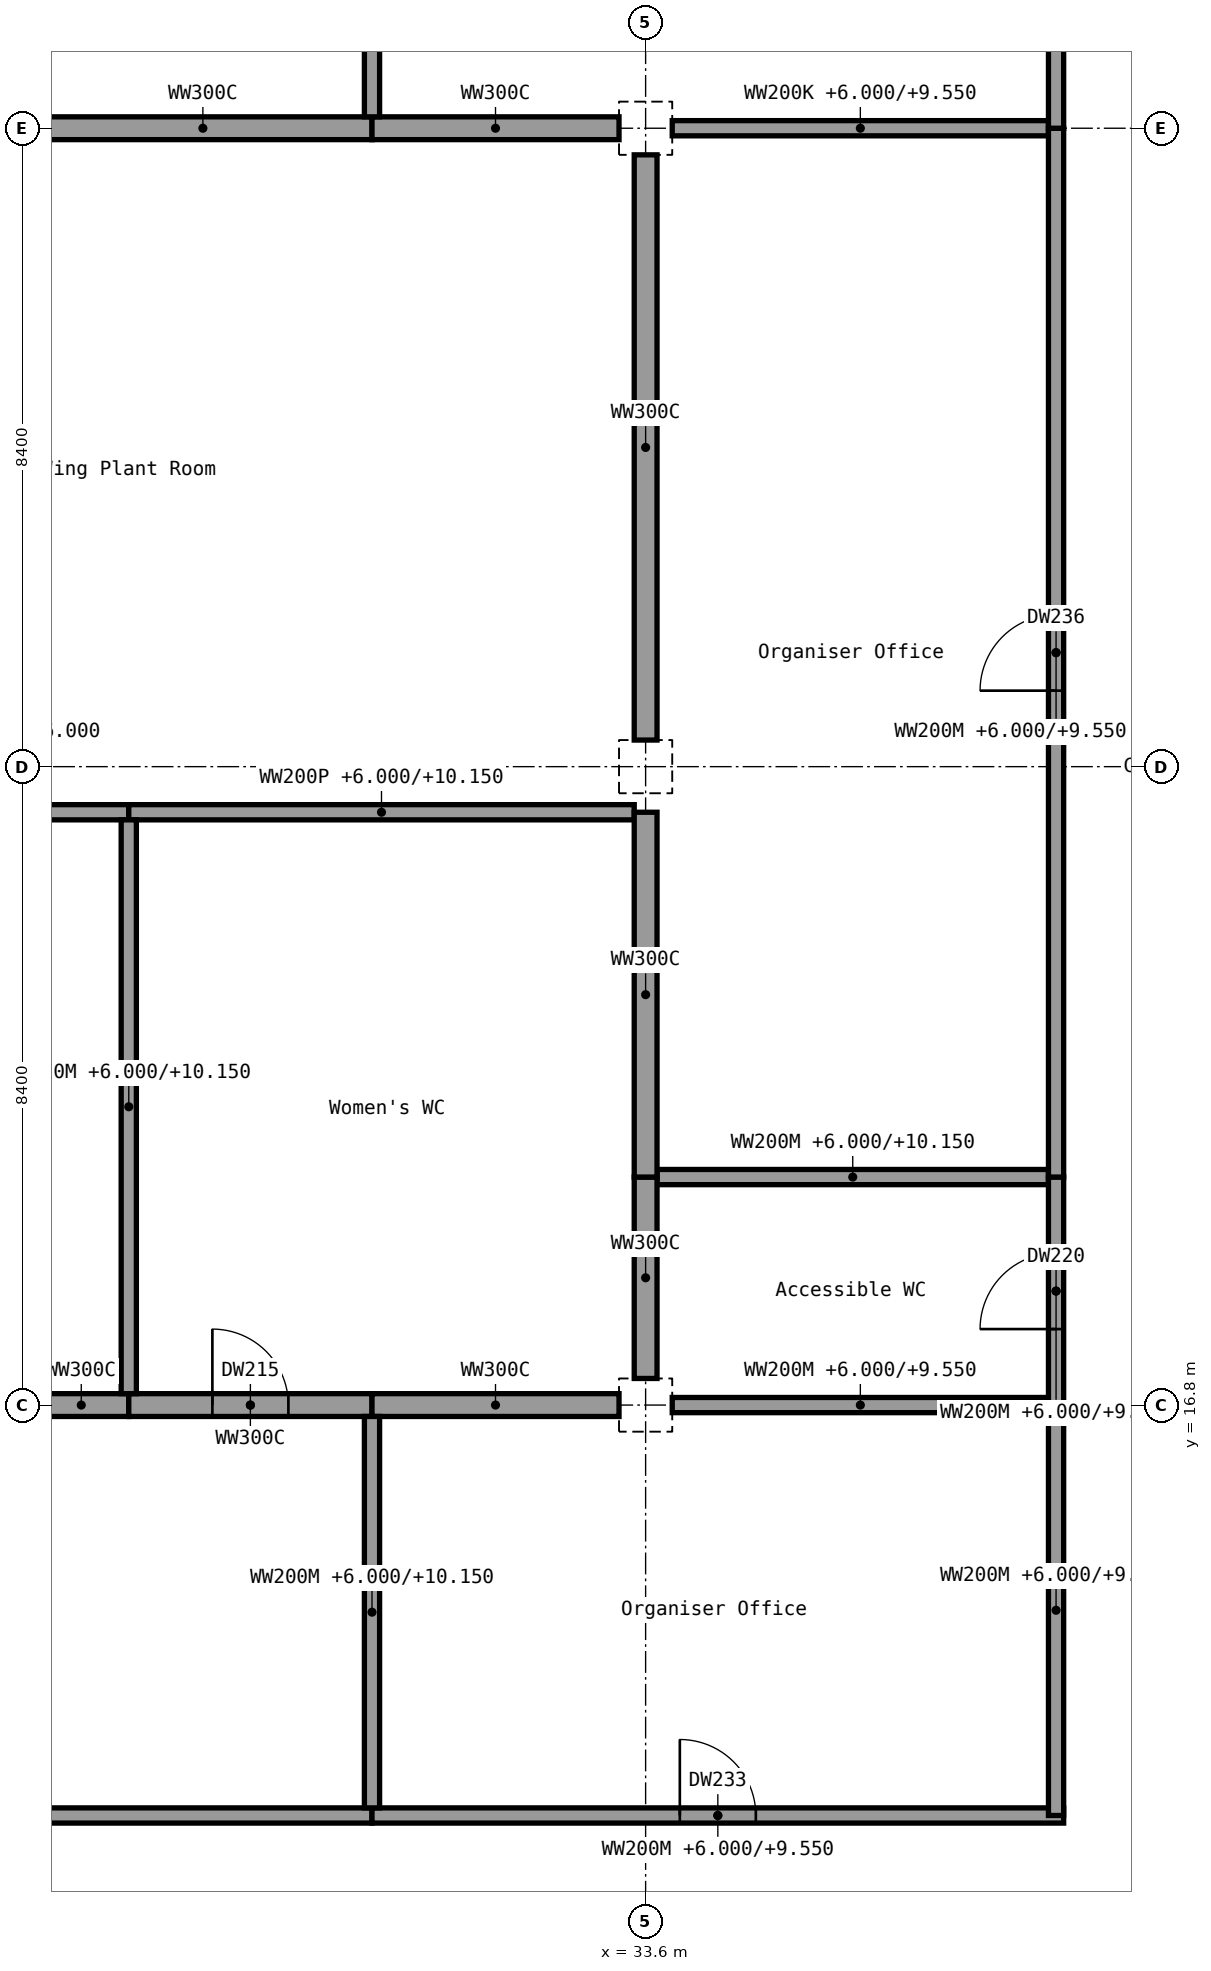
"""IFC4 building model, lengths in metres.
Left out: names, types, materials, properties, quantities, classifications, styles, units other than length and angle.
Written with IfcOpenShell. Run it as: python <this file> out.ifc"""

import sys

from ifc_helpers import new_model, si_unit, direction, frame, frame_2d, origin, origin_2d, place, context, subcontext, project, spatial, rectangle, extrude, element, fill, save


model = new_model("IFC4")
c1 = context("Model", 3, precision=1e-05, world=origin(), true_north=direction((0.0, 1.0)))
c2 = subcontext(c1, "Body", "Model", "MODEL_VIEW")
j1 = project(units=[si_unit("LENGTHUNIT", "METRE"), si_unit("PLANEANGLEUNIT", "RADIAN")], contexts=[c1])
p1 = place(None, origin())
s1 = spatial("IfcSite", under=j1, at=p1, CompositionType="ELEMENT")
p2 = place(p1, origin())
s2 = spatial("IfcBuilding", under=s1, at=p2, CompositionType="ELEMENT")
p3 = place(p2, frame((0.0, 0.0, 6.0)))
s3 = spatial("IfcBuildingStorey", under=s2, at=p3, CompositionType="ELEMENT", Elevation=6.0)
for number, where, z_axis, x_axis in (
    (1, (33.6, 16.8, 0.0), (0.0, 0.0, 1.0), (1.0, 0.0, 0.0)),
    (2, (33.6, 25.2, 0.0), (0.0, 0.0, 1.0), (1.0, 0.0, 0.0)),
    (3, (33.6, 33.6, 0.0), (0.0, 0.0, 1.0), (1.0, 0.0, 0.0)),
):
    element("IfcColumn", number, at=place(p3, frame(where, z_axis=z_axis, x_axis=x_axis)), inside=s3, PredefinedType="COLUMN", context=c2, shape_type="SweptSolid", body=[
        extrude(rectangle(XDim=0.7, YDim=0.7, at=origin_2d()), origin(), (0.0, 0.0, 1.0), 4.5),
    ])
p4 = place(p3, frame((18.0, 11.4, 0.0), z_axis=(0.0, 0.0, 1.0), x_axis=(1.0, 0.0, 0.0)))
e4 = element("IfcWall", 4, at=p4, inside=s3, PredefinedType="PARTITIONING", context=c2, shape_type="SweptSolid", body=[
    extrude(rectangle(XDim=12.0, YDim=0.2, at=frame_2d((6.0, 0.0))), origin(), (0.0, 0.0, 1.0), 3.55),
])
p5 = place(p4, frame((5.5, 0.0, 0.0)))
e5 = element("IfcOpeningElement", 5, at=p5, cuts=e4, PredefinedType="OPENING", context=c2, shape_type="SweptSolid", body=[
    extrude(rectangle(XDim=1.0, YDim=2.1, at=frame_2d((0.5, 1.05))), frame((0.0, 0.1, 0.0), z_axis=(0.0, -1.0, 0.0), x_axis=(1.0, 0.0, 0.0)), (0.0, 0.0, 1.0), 0.2),
])
p6 = place(p3, frame((30.0, 11.4, 0.0), z_axis=(0.0, 0.0, 1.0), x_axis=(1.0, 0.0, 0.0)))
e6 = element("IfcWall", 6, at=p6, inside=s3, PredefinedType="PARTITIONING", context=c2, shape_type="SweptSolid", body=[
    extrude(rectangle(XDim=9.1, YDim=0.2, at=frame_2d((4.55, 0.0))), origin(), (0.0, 0.0, 1.0), 3.55),
])
p7 = place(p6, frame((4.05, 0.0, 0.0)))
e7 = element("IfcOpeningElement", 7, at=p7, cuts=e6, PredefinedType="OPENING", context=c2, shape_type="SweptSolid", body=[
    extrude(rectangle(XDim=1.0, YDim=2.1, at=frame_2d((0.5, 1.05))), frame((0.0, 0.1, 0.0), z_axis=(0.0, -1.0, 0.0), x_axis=(1.0, 0.0, 0.0)), (0.0, 0.0, 1.0), 0.2),
])
p8 = place(p3, frame((25.55, 16.8, 0.0), z_axis=(0.0, 0.0, 1.0), x_axis=(1.0, 0.0, 0.0)))
e8 = element("IfcWall", 8, at=p8, inside=s3, PredefinedType="SHEAR", context=c2, shape_type="SweptSolid", body=[
    extrude(rectangle(XDim=1.25, YDim=0.3, at=frame_2d((0.625, 0.0))), origin(), (0.0, 0.0, 1.0), 4.15),
])
p9 = place(p3, frame((26.8, 16.8, 0.0), z_axis=(0.0, 0.0, 1.0), x_axis=(1.0, 0.0, 0.0)))
e9 = element("IfcWall", 9, at=p9, inside=s3, PredefinedType="SHEAR", context=c2, shape_type="SweptSolid", body=[
    extrude(rectangle(XDim=3.2, YDim=0.3, at=frame_2d((1.6, 0.0))), origin(), (0.0, 0.0, 1.0), 4.15),
])
p10 = place(p9, frame((1.1, 0.0, 0.0)))
e10 = element("IfcOpeningElement", 10, at=p10, cuts=e9, PredefinedType="OPENING", context=c2, shape_type="SweptSolid", body=[
    extrude(rectangle(XDim=1.0, YDim=2.1, at=frame_2d((0.5, 1.05))), frame((0.0, 0.15, 0.0), z_axis=(0.0, -1.0, 0.0), x_axis=(1.0, 0.0, 0.0)), (0.0, 0.0, 1.0), 0.3),
])
p11 = place(p3, frame((30.0, 16.8, 0.0), z_axis=(0.0, 0.0, 1.0), x_axis=(1.0, 0.0, 0.0)))
e11 = element("IfcWall", 11, at=p11, inside=s3, PredefinedType="SHEAR", context=c2, shape_type="SweptSolid", body=[
    extrude(rectangle(XDim=3.25, YDim=0.3, at=frame_2d((1.625, 0.0))), origin(), (0.0, 0.0, 1.0), 4.15),
])
p12 = place(p3, frame((33.95, 16.8, 0.0), z_axis=(0.0, 0.0, 1.0), x_axis=(1.0, 0.0, 0.0)))
e12 = element("IfcWall", 12, at=p12, inside=s3, PredefinedType="PARTITIONING", context=c2, shape_type="SweptSolid", body=[
    extrude(rectangle(XDim=4.95, YDim=0.2, at=frame_2d((2.475, 0.0))), origin(), (0.0, 0.0, 1.0), 3.55),
])
p13 = place(p3, frame((33.75, 19.8, 0.0), z_axis=(0.0, 0.0, 1.0), x_axis=(1.0, 0.0, 0.0)))
e13 = element("IfcWall", 13, at=p13, inside=s3, PredefinedType="PARTITIONING", context=c2, shape_type="SweptSolid", body=[
    extrude(rectangle(XDim=5.15, YDim=0.2, at=frame_2d((2.575, 0.0))), origin(), (0.0, 0.0, 1.0), 4.15),
])
p14 = place(p3, frame((20.1, 24.6, 0.0), z_axis=(0.0, 0.0, 1.0), x_axis=(1.0, 0.0, 0.0)))
e14 = element("IfcWall", 14, at=p14, inside=s3, PredefinedType="SOLIDWALL", context=c2, shape_type="SweptSolid", body=[
    extrude(rectangle(XDim=6.7, YDim=0.2, at=frame_2d((3.35, 0.0))), origin(), (0.0, 0.0, 1.0), 4.15),
])
p15 = place(p3, frame((26.8, 24.6, 0.0), z_axis=(0.0, 0.0, 1.0), x_axis=(1.0, 0.0, 0.0)))
e15 = element("IfcWall", 15, at=p15, inside=s3, PredefinedType="SOLIDWALL", context=c2, shape_type="SweptSolid", body=[
    extrude(rectangle(XDim=6.65, YDim=0.2, at=frame_2d((3.325, 0.0))), origin(), (0.0, 0.0, 1.0), 4.15),
])
p16 = place(p3, frame((25.55, 33.6, 0.0), z_axis=(0.0, 0.0, 1.0), x_axis=(1.0, 0.0, 0.0)))
e16 = element("IfcWall", 16, at=p16, inside=s3, PredefinedType="SHEAR", context=c2, shape_type="SweptSolid", body=[
    extrude(rectangle(XDim=4.45, YDim=0.3, at=frame_2d((2.225, 0.0))), origin(), (0.0, 0.0, 1.0), 4.15),
])
p17 = place(p3, frame((30.0, 33.6, 0.0), z_axis=(0.0, 0.0, 1.0), x_axis=(1.0, 0.0, 0.0)))
e17 = element("IfcWall", 17, at=p17, inside=s3, PredefinedType="SHEAR", context=c2, shape_type="SweptSolid", body=[
    extrude(rectangle(XDim=3.25, YDim=0.3, at=frame_2d((1.625, 0.0))), origin(), (0.0, 0.0, 1.0), 4.15),
])
p18 = place(p3, frame((33.95, 33.6, 0.0), z_axis=(0.0, 0.0, 1.0), x_axis=(1.0, 0.0, 0.0)))
e18 = element("IfcWall", 18, at=p18, inside=s3, PredefinedType="SOLIDWALL", context=c2, shape_type="SweptSolid", body=[
    extrude(rectangle(XDim=4.95, YDim=0.2, at=frame_2d((2.475, 0.0))), origin(), (0.0, 0.0, 1.0), 3.55),
])
p19 = place(p3, frame((26.8, 16.95, 0.0), z_axis=(0.0, 0.0, 1.0), x_axis=(0.0, 1.0, 0.0)))
e19 = element("IfcWall", 19, at=p19, inside=s3, PredefinedType="PARTITIONING", context=c2, shape_type="SweptSolid", body=[
    extrude(rectangle(XDim=7.55, YDim=0.2, at=frame_2d((3.775, 0.0))), origin(), (0.0, 0.0, 1.0), 4.15),
])
p20 = place(p3, frame((30.0, 11.5, 0.0), z_axis=(0.0, 0.0, 1.0), x_axis=(0.0, 1.0, 0.0)))
e20 = element("IfcWall", 20, at=p20, inside=s3, PredefinedType="PARTITIONING", context=c2, shape_type="SweptSolid", body=[
    extrude(rectangle(XDim=5.15, YDim=0.2, at=frame_2d((2.575, 0.0))), origin(), (0.0, 0.0, 1.0), 4.15),
])
p21 = place(p3, frame((30.0, 33.75, 0.0), z_axis=(0.0, 0.0, 1.0), x_axis=(0.0, 1.0, 0.0)))
e21 = element("IfcWall", 21, at=p21, inside=s3, PredefinedType="SOLIDWALL", context=c2, shape_type="SweptSolid", body=[
    extrude(rectangle(XDim=5.15, YDim=0.2, at=frame_2d((2.575, 0.0))), origin(), (0.0, 0.0, 1.0), 4.15),
])
p22 = place(p3, frame((33.6, 17.15, 0.0), z_axis=(0.0, 0.0, 1.0), x_axis=(0.0, 1.0, 0.0)))
e22 = element("IfcWall", 22, at=p22, inside=s3, PredefinedType="SHEAR", context=c2, shape_type="SweptSolid", body=[
    extrude(rectangle(XDim=2.65, YDim=0.3, at=frame_2d((1.325, 0.0))), origin(), (0.0, 0.0, 1.0), 4.15),
])
p23 = place(p3, frame((33.6, 19.8, 0.0), z_axis=(0.0, 0.0, 1.0), x_axis=(0.0, 1.0, 0.0)))
e23 = element("IfcWall", 23, at=p23, inside=s3, PredefinedType="SHEAR", context=c2, shape_type="SweptSolid", body=[
    extrude(rectangle(XDim=4.8, YDim=0.3, at=frame_2d((2.4, 0.0))), origin(), (0.0, 0.0, 1.0), 4.15),
])
p24 = place(p3, frame((33.6, 25.55, 0.0), z_axis=(0.0, 0.0, 1.0), x_axis=(0.0, 1.0, 0.0)))
e24 = element("IfcWall", 24, at=p24, inside=s3, PredefinedType="SHEAR", context=c2, shape_type="SweptSolid", body=[
    extrude(rectangle(XDim=7.7, YDim=0.3, at=frame_2d((3.85, 0.0))), origin(), (0.0, 0.0, 1.0), 4.15),
])
p25 = place(p3, frame((39.0, 11.4, 0.0), z_axis=(0.0, 0.0, 1.0), x_axis=(0.0, 1.0, 0.0)))
e25 = element("IfcWall", 25, at=p25, inside=s3, PredefinedType="PARTITIONING", context=c2, shape_type="SweptSolid", body=[
    extrude(rectangle(XDim=5.4, YDim=0.2, at=frame_2d((2.7, 0.0))), origin(), (0.0, 0.0, 1.0), 3.55),
])
p26 = place(p3, frame((39.0, 16.8, 0.0), z_axis=(0.0, 0.0, 1.0), x_axis=(0.0, 1.0, 0.0)))
e26 = element("IfcWall", 26, at=p26, inside=s3, PredefinedType="PARTITIONING", context=c2, shape_type="SweptSolid", body=[
    extrude(rectangle(XDim=3.0, YDim=0.2, at=frame_2d((1.5, 0.0))), origin(), (0.0, 0.0, 1.0), 3.55),
])
p27 = place(p26, frame((1.0, 0.0, 0.0)))
e27 = element("IfcOpeningElement", 27, at=p27, cuts=e26, PredefinedType="OPENING", context=c2, shape_type="SweptSolid", body=[
    extrude(rectangle(XDim=1.0, YDim=2.1, at=frame_2d((0.5, 1.05))), frame((0.0, 0.1, 0.0), z_axis=(0.0, -1.0, 0.0), x_axis=(1.0, 0.0, 0.0)), (0.0, 0.0, 1.0), 0.2),
])
p28 = place(p3, frame((39.0, 19.8, 0.0), z_axis=(0.0, 0.0, 1.0), x_axis=(0.0, 1.0, 0.0)))
e28 = element("IfcWall", 28, at=p28, inside=s3, PredefinedType="PARTITIONING", context=c2, shape_type="SweptSolid", body=[
    extrude(rectangle(XDim=13.8, YDim=0.2, at=frame_2d((6.9, 0.0))), origin(), (0.0, 0.0, 1.0), 3.55),
])
p29 = place(p28, frame((6.4, 0.0, 0.0)))
e29 = element("IfcOpeningElement", 29, at=p29, cuts=e28, PredefinedType="OPENING", context=c2, shape_type="SweptSolid", body=[
    extrude(rectangle(XDim=1.0, YDim=2.1, at=frame_2d((0.5, 1.05))), frame((0.0, 0.1, 0.0), z_axis=(0.0, -1.0, 0.0), x_axis=(1.0, 0.0, 0.0)), (0.0, 0.0, 1.0), 0.2),
])
p30 = place(p3, frame((39.0, 33.6, 0.0), z_axis=(0.0, 0.0, 1.0), x_axis=(0.0, 1.0, 0.0)))
e30 = element("IfcWall", 30, at=p30, inside=s3, PredefinedType="SOLIDWALL", context=c2, shape_type="SweptSolid", body=[
    extrude(rectangle(XDim=5.4, YDim=0.2, at=frame_2d((2.7, 0.0))), origin(), (0.0, 0.0, 1.0), 3.55),
])
p31 = place(p10, origin())
e31 = element("IfcDoor", 31, at=p31, inside=s3, OperationType="SINGLE_SWING_LEFT", PredefinedType="DOOR", context=c2, shape_type="SweptSolid", body=[
    extrude(rectangle(XDim=1.0, YDim=2.1, at=frame_2d((0.5, 1.05))), frame((0.0, 0.025, 0.0), z_axis=(0.0, -1.0, 0.0), x_axis=(1.0, 0.0, 0.0)), (0.0, 0.0, 1.0), 0.05),
])
fill(e10, e31)
p32 = place(p27, origin())
e32 = element("IfcDoor", 32, at=p32, inside=s3, OperationType="SINGLE_SWING_LEFT", PredefinedType="DOOR", context=c2, shape_type="SweptSolid", body=[
    extrude(rectangle(XDim=1.0, YDim=2.1, at=frame_2d((0.5, 1.05))), frame((0.0, 0.025, 0.0), z_axis=(0.0, -1.0, 0.0), x_axis=(1.0, 0.0, 0.0)), (0.0, 0.0, 1.0), 0.05),
])
fill(e27, e32)
p33 = place(p7, origin())
e33 = element("IfcDoor", 33, at=p33, inside=s3, OperationType="SINGLE_SWING_LEFT", PredefinedType="DOOR", context=c2, shape_type="SweptSolid", body=[
    extrude(rectangle(XDim=1.0, YDim=2.1, at=frame_2d((0.5, 1.05))), frame((0.0, 0.025, 0.0), z_axis=(0.0, -1.0, 0.0), x_axis=(1.0, 0.0, 0.0)), (0.0, 0.0, 1.0), 0.05),
])
fill(e7, e33)
p34 = place(p29, origin())
e34 = element("IfcDoor", 34, at=p34, inside=s3, OperationType="SINGLE_SWING_RIGHT", PredefinedType="DOOR", context=c2, shape_type="SweptSolid", body=[
    extrude(rectangle(XDim=1.0, YDim=2.1, at=frame_2d((0.5, 1.05))), frame((0.0, 0.025, 0.0), z_axis=(0.0, -1.0, 0.0), x_axis=(1.0, 0.0, 0.0)), (0.0, 0.0, 1.0), 0.05),
])
fill(e29, e34)
save(model, sys.argv[1])
